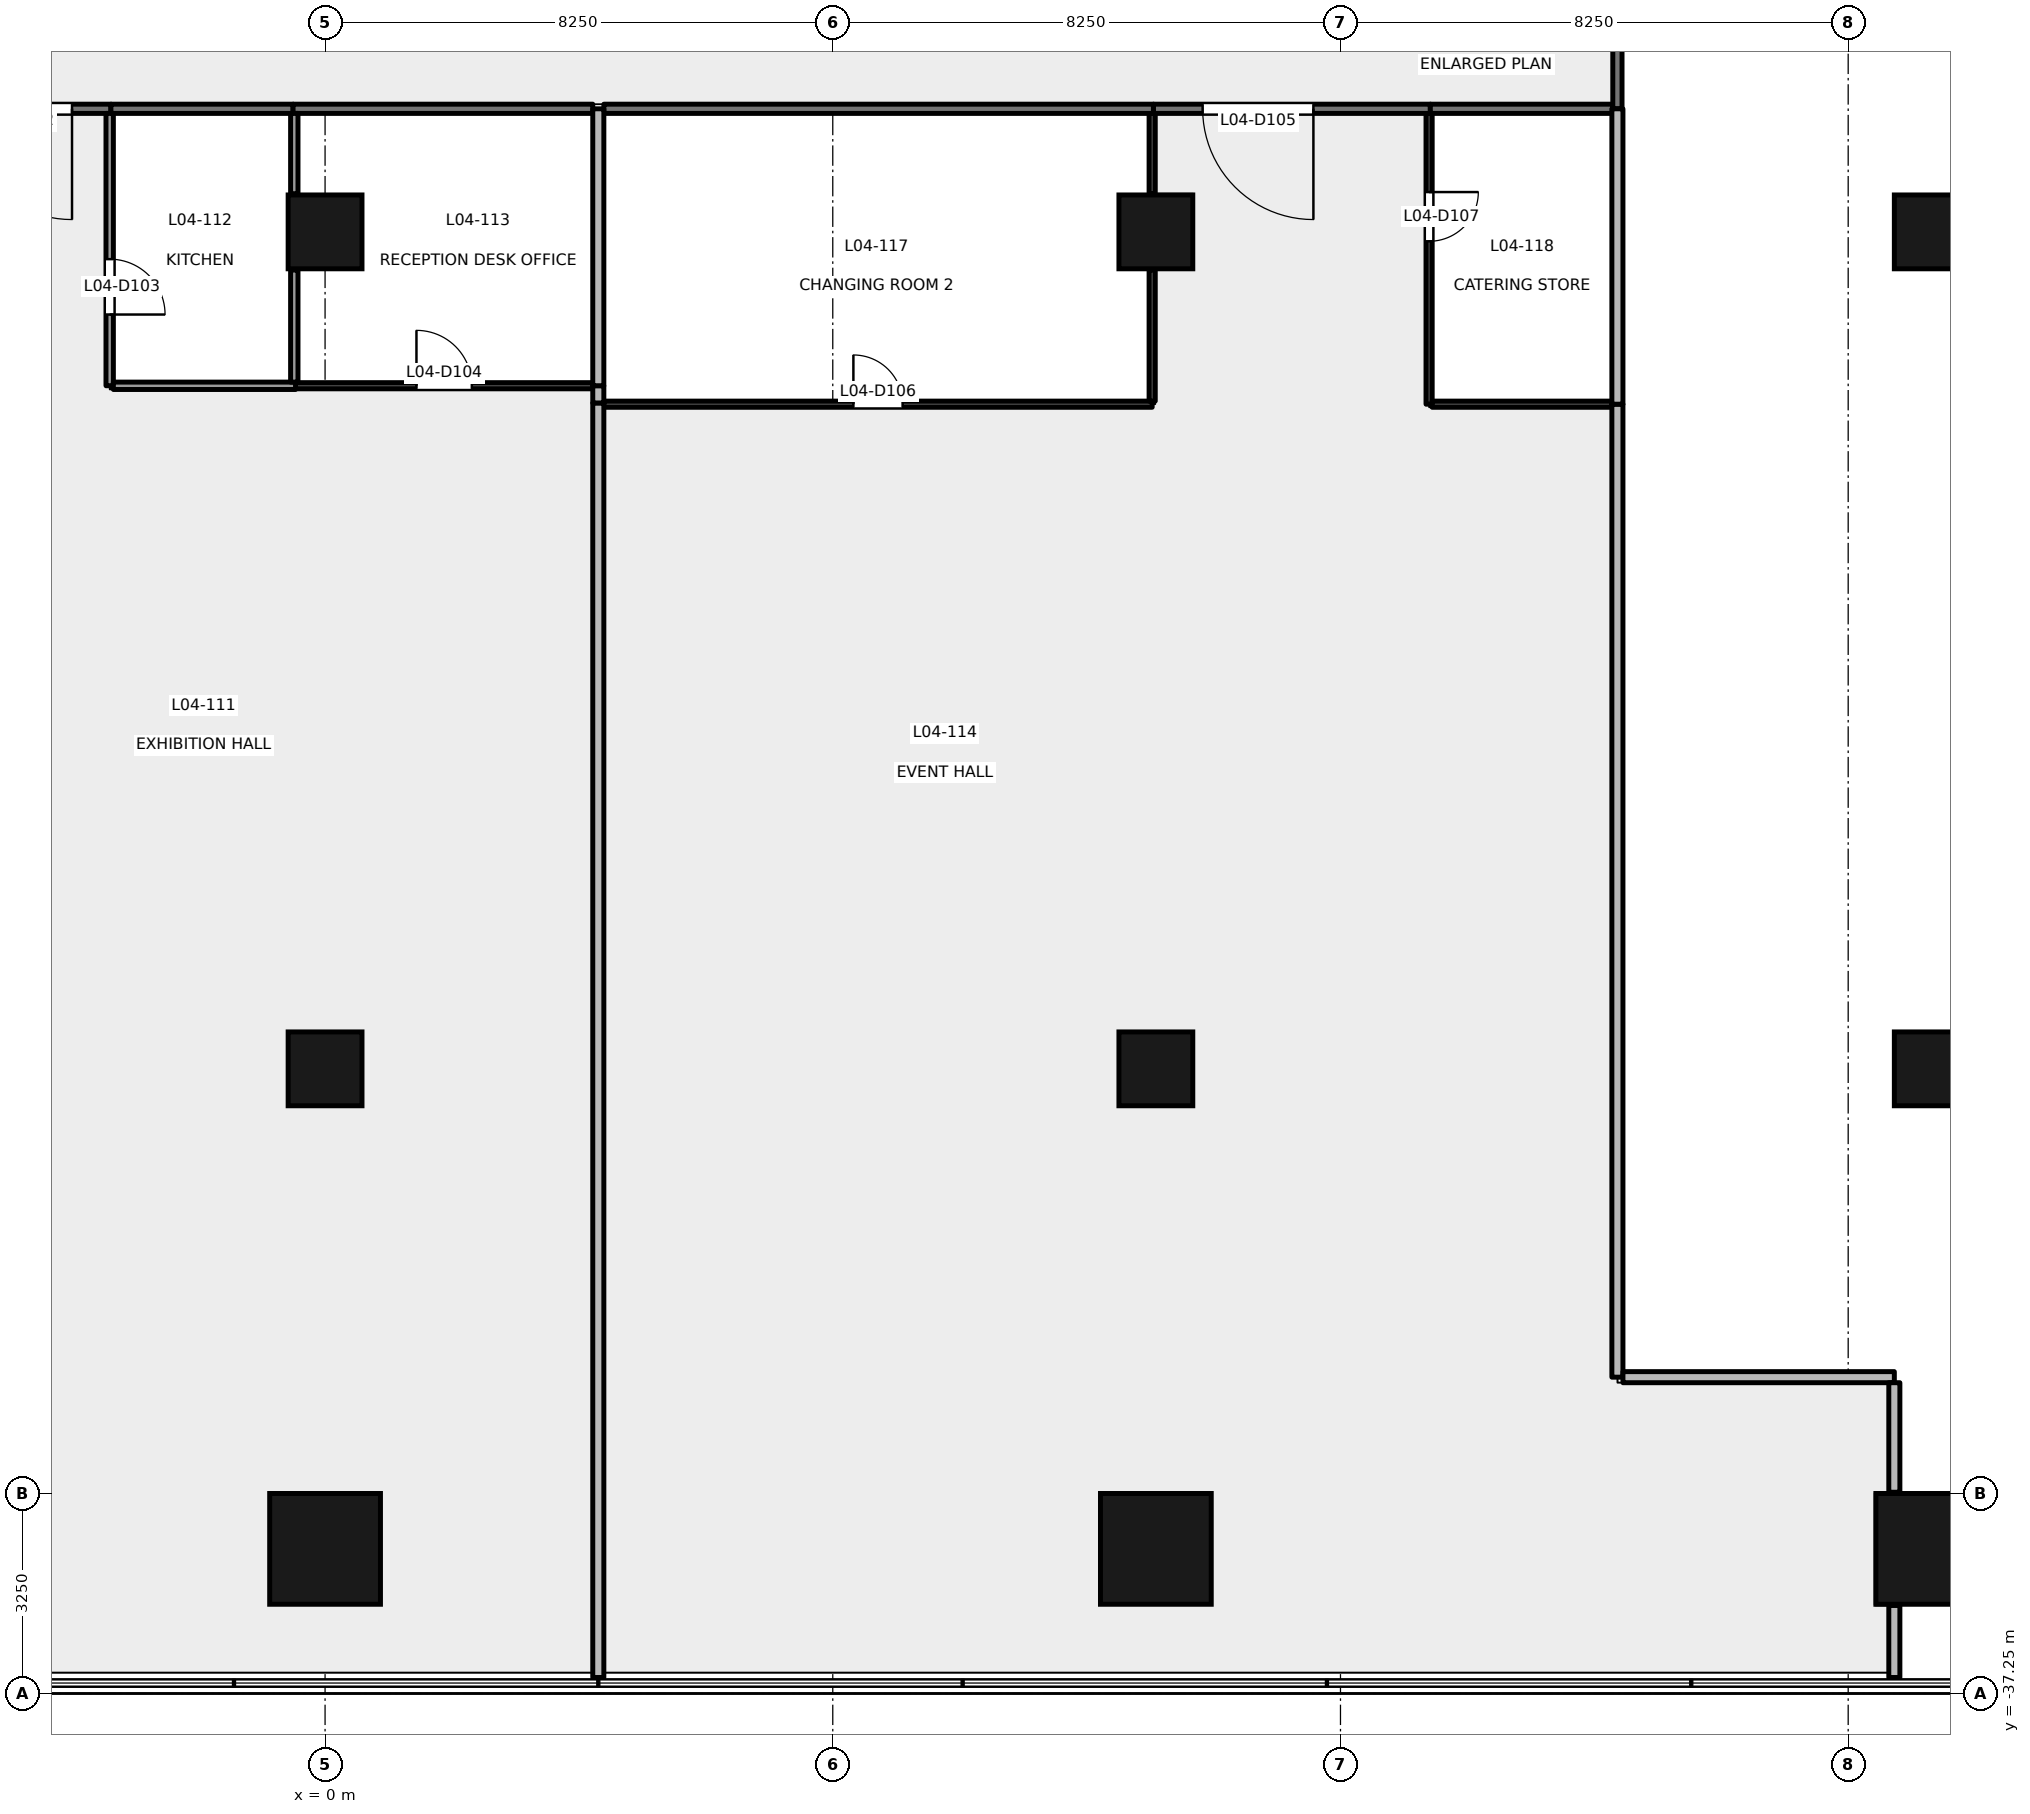
"""IFC4 building model, lengths in metres.
Left out: names, types, materials, properties, quantities, classifications, styles, units other than length and angle.
Written with IfcOpenShell. Run it as: python <this file> out.ifc"""

import sys

from ifc_helpers import new_model, si_unit, direction, frame, frame_2d, origin, origin_2d, place, context, subcontext, project, spatial, rectangle, extrude, element, fill, save


model = new_model("IFC4")
c1 = context("Model", 3, precision=1e-05, world=origin(), true_north=direction((0.0, 1.0)))
c2 = subcontext(c1, "Body", "Model", "MODEL_VIEW")
j1 = project(units=[si_unit("LENGTHUNIT", "METRE"), si_unit("PLANEANGLEUNIT", "RADIAN")], contexts=[c1])
p1 = place(None, origin())
s1 = spatial("IfcSite", under=j1, at=p1, CompositionType="ELEMENT")
p2 = place(p1, origin())
s2 = spatial("IfcBuilding", under=s1, at=p2, CompositionType="ELEMENT")
p3 = place(p2, frame((0.0, 0.0, 22.2)))
s3 = spatial("IfcBuildingStorey", under=s2, at=p3, CompositionType="ELEMENT", Elevation=22.2)
for number, where, z_axis, x_axis in (
    (1, (0.0, -34.9, -0.2), (0.0, 0.0, 1.0), (1.0, 0.0, 0.0)),
    (2, (13.5, -34.9, -0.2), (0.0, 0.0, 1.0), (1.0, 0.0, 0.0)),
    (3, (26.1, -34.9, -0.2), (0.0, 0.0, 1.0), (1.0, 0.0, 0.0)),
):
    element("IfcColumn", number, at=place(p3, frame(where, z_axis=z_axis, x_axis=x_axis)), inside=s3, PredefinedType="COLUMN", context=c2, shape_type="SweptSolid", body=[
        extrude(rectangle(XDim=1.8, YDim=1.8, at=origin_2d()), origin(), (0.0, 0.0, 1.0), 4.8),
    ])
for number, where, z_axis, x_axis in (
    (4, (0.0, -27.1, -0.2), (0.0, 0.0, 1.0), (1.0, 0.0, 0.0)),
    (5, (13.5, -27.1, -0.2), (0.0, 0.0, 1.0), (1.0, 0.0, 0.0)),
    (6, (26.1, -27.1, -0.2), (0.0, 0.0, 1.0), (1.0, 0.0, 0.0)),
    (7, (0.0, -13.5, -0.2), (0.0, 0.0, 1.0), (1.0, 0.0, 0.0)),
    (8, (13.5, -13.5, -0.2), (0.0, 0.0, 1.0), (1.0, 0.0, 0.0)),
    (9, (26.1, -13.5, -0.2), (0.0, 0.0, 1.0), (1.0, 0.0, 0.0)),
):
    element("IfcColumn", number, at=place(p3, frame(where, z_axis=z_axis, x_axis=x_axis)), inside=s3, PredefinedType="COLUMN", context=c2, shape_type="SweptSolid", body=[
        extrude(rectangle(XDim=1.2, YDim=1.2, at=origin_2d()), origin(), (0.0, 0.0, 1.0), 4.8),
    ])
p4 = place(p3, frame((-3.48, -11.5, 0.0), z_axis=(0.0, 0.0, 1.0), x_axis=(-1.0, 0.0, 0.0)))
e10 = element("IfcWall", 10, at=p4, inside=s3, PredefinedType="PARTITIONING", context=c2, shape_type="SweptSolid", body=[
    extrude(rectangle(XDim=3.83, YDim=0.15, at=frame_2d((1.915, 0.0))), origin(), (0.0, 0.0, 1.0), 3.6),
])
p5 = place(p4, frame((0.632, 0.0, 0.0)))
e11 = element("IfcOpeningElement", 11, at=p5, cuts=e10, PredefinedType="OPENING", context=c2, shape_type="SweptSolid", body=[
    extrude(rectangle(XDim=1.8, YDim=2.1, at=frame_2d((0.9, 1.05))), frame((0.0, 0.085, 0.0), z_axis=(0.0, -1.0, 0.0), x_axis=(1.0, 0.0, 0.0)), (0.0, 0.0, 1.0), 0.171),
])
p6 = place(p3, frame((-0.52, -11.5, 0.0), z_axis=(0.0, 0.0, 1.0), x_axis=(-1.0, 0.0, 0.0)))
e12 = element("IfcWall", 12, at=p6, inside=s3, PredefinedType="PARTITIONING", context=c2, shape_type="SweptSolid", body=[
    extrude(rectangle(XDim=2.96, YDim=0.15, at=frame_2d((1.48, 0.0))), origin(), (0.0, 0.0, 1.0), 4.6),
])
p7 = place(p3, frame((4.35, -11.5, 0.0), z_axis=(0.0, 0.0, 1.0), x_axis=(-1.0, 0.0, 0.0)))
e13 = element("IfcWall", 13, at=p7, inside=s3, PredefinedType="PARTITIONING", context=c2, shape_type="SweptSolid", body=[
    extrude(rectangle(XDim=4.87, YDim=0.15, at=frame_2d((2.435, 0.0))), origin(), (0.0, 0.0, 1.0), 3.6),
])
p8 = place(p3, frame((17.96, -11.5, 0.0), z_axis=(0.0, 0.0, 1.0), x_axis=(-1.0, 0.0, 0.0)))
e14 = element("IfcWall", 14, at=p8, inside=s3, PredefinedType="PARTITIONING", context=c2, shape_type="SweptSolid", body=[
    extrude(rectangle(XDim=4.5, YDim=0.15, at=frame_2d((2.25, 0.0))), origin(), (0.0, 0.0, 1.0), 3.2),
])
p9 = place(p8, frame((1.9, 0.0, 0.0)))
e15 = element("IfcOpeningElement", 15, at=p9, cuts=e14, PredefinedType="OPENING", context=c2, shape_type="SweptSolid", body=[
    extrude(rectangle(XDim=1.8, YDim=2.1, at=frame_2d((0.9, 1.05))), frame((0.0, 0.085, 0.0), z_axis=(0.0, -1.0, 0.0), x_axis=(1.0, 0.0, 0.0)), (0.0, 0.0, 1.0), 0.171),
])
p10 = place(p3, frame((13.46, -11.5, 0.0), z_axis=(0.0, 0.0, 1.0), x_axis=(-1.0, 0.0, 0.0)))
e16 = element("IfcWall", 16, at=p10, inside=s3, PredefinedType="PARTITIONING", context=c2, shape_type="SweptSolid", body=[
    extrude(rectangle(XDim=8.93, YDim=0.15, at=frame_2d((4.465, 0.0))), origin(), (0.0, 0.0, 1.0), 3.6),
])
p11 = place(p3, frame((20.925, -11.5, 0.0), z_axis=(0.0, 0.0, 1.0), x_axis=(-1.0, 0.0, 0.0)))
e17 = element("IfcWall", 17, at=p11, inside=s3, PredefinedType="PARTITIONING", context=c2, shape_type="SweptSolid", body=[
    extrude(rectangle(XDim=2.965, YDim=0.15, at=frame_2d((1.482, 0.0))), origin(), (0.0, 0.0, 1.0), 3.2),
])
p12 = place(p3, frame((21.0, -7.4, 0.0), z_axis=(0.0, 0.0, 1.0), x_axis=(0.0, -1.0, 0.0)))
e18 = element("IfcWall", 18, at=p12, inside=s3, PredefinedType="PARTITIONING", context=c2, shape_type="SweptSolid", body=[
    extrude(rectangle(XDim=4.1, YDim=0.15, at=frame_2d((2.05, 0.0))), origin(), (0.0, 0.0, 1.0), 4.0),
])
p13 = place(p12, frame((1.15, 0.0, 0.0)))
e19 = element("IfcOpeningElement", 19, at=p13, cuts=e18, PredefinedType="OPENING", context=c2, shape_type="SweptSolid", body=[
    extrude(rectangle(XDim=1.8, YDim=2.1, at=frame_2d((0.9, 1.05))), frame((0.0, 0.085, 0.0), z_axis=(0.0, -1.0, 0.0), x_axis=(1.0, 0.0, 0.0)), (0.0, 0.0, 1.0), 0.171),
])
p14 = place(p3, frame((-3.5, -11.575, 0.0), z_axis=(0.0, 0.0, 1.0), x_axis=(0.0, -1.0, 0.0)))
e20 = element("IfcWall", 20, at=p14, inside=s3, PredefinedType="PARTITIONING", context=c2, shape_type="SweptSolid", body=[
    extrude(rectangle(XDim=4.425, YDim=0.12, at=frame_2d((2.212, 0.0))), origin(), (0.0, 0.0, 1.0), 4.6),
])
p15 = place(p14, frame((2.368, 0.0, 0.0)))
e21 = element("IfcOpeningElement", 21, at=p15, cuts=e20, PredefinedType="OPENING", context=c2, shape_type="SweptSolid", body=[
    extrude(rectangle(XDim=0.9, YDim=2.1, at=frame_2d((0.45, 1.05))), frame((0.0, 0.071, 0.0), z_axis=(0.0, -1.0, 0.0), x_axis=(1.0, 0.0, 0.0)), (0.0, 0.0, 1.0), 0.141),
])
p16 = place(p3, frame((-3.44, -16.001, 0.0), z_axis=(0.0, 0.0, 1.0), x_axis=(1.0, 0.0, 0.0)))
e22 = element("IfcWall", 22, at=p16, inside=s3, PredefinedType="PARTITIONING", context=c2, shape_type="SweptSolid", body=[
    extrude(rectangle(XDim=2.96, YDim=0.12, at=frame_2d((1.48, 0.0))), origin(), (0.0, 0.0, 1.0), 4.6),
])
p17 = place(p3, frame((-0.48, -16.0, 0.0), z_axis=(0.0, 0.0, 1.0), x_axis=(1.0, 0.0, 0.0)))
e23 = element("IfcWall", 23, at=p17, inside=s3, PredefinedType="PARTITIONING", context=c2, shape_type="SweptSolid", body=[
    extrude(rectangle(XDim=4.83, YDim=0.1, at=frame_2d((2.415, 0.0))), origin(), (0.0, 0.0, 1.0), 3.6),
])
p18 = place(p17, frame((1.965, 0.0, 0.0)))
e24 = element("IfcOpeningElement", 24, at=p18, cuts=e23, PredefinedType="OPENING", context=c2, shape_type="SweptSolid", body=[
    extrude(rectangle(XDim=0.9, YDim=2.1, at=frame_2d((0.45, 1.05))), frame((0.0, 0.061, 0.0), z_axis=(0.0, -1.0, 0.0), x_axis=(1.0, 0.0, 0.0)), (0.0, 0.0, 1.0), 0.121),
])
p19 = place(p3, frame((4.44, -16.28, 0.0), z_axis=(0.0, 0.0, 1.0), x_axis=(0.0, -1.0, 0.0)))
e25 = element("IfcWall", 25, at=p19, inside=s3, PredefinedType="PARTITIONING", context=c2, shape_type="SweptSolid", body=[
    extrude(rectangle(XDim=20.71, YDim=0.18, at=frame_2d((10.355, 0.0))), origin(), (0.0, 0.0, 1.0), 3.5),
])
p20 = place(p3, frame((4.44, -16.0, 0.0), z_axis=(0.0, 0.0, 1.0), x_axis=(0.0, -1.0, 0.0)))
e26 = element("IfcWall", 26, at=p20, inside=s3, PredefinedType="PARTITIONING", context=c2, shape_type="SweptSolid", body=[
    extrude(rectangle(XDim=0.28, YDim=0.18, at=frame_2d((0.14, 0.0))), origin(), (0.0, 0.0, 1.0), 3.6),
])
p21 = place(p3, frame((-0.5, -11.575, 0.0), z_axis=(0.0, 0.0, 1.0), x_axis=(0.0, -1.0, 0.0)))
e27 = element("IfcWall", 27, at=p21, inside=s3, PredefinedType="PARTITIONING", context=c2, shape_type="SweptSolid", body=[
    extrude(rectangle(XDim=1.305, YDim=0.12, at=frame_2d((0.652, 0.0))), origin(), (0.0, 0.0, 1.0), 4.6),
])
p22 = place(p3, frame((-0.5, -14.12, 0.0), z_axis=(0.0, 0.0, 1.0), x_axis=(0.0, -1.0, 0.0)))
e28 = element("IfcWall", 28, at=p22, inside=s3, PredefinedType="PARTITIONING", context=c2, shape_type="SweptSolid", body=[
    extrude(rectangle(XDim=1.821, YDim=0.12, at=frame_2d((0.91, 0.0))), origin(), (0.0, 0.0, 1.0), 4.6),
])
p23 = place(p3, frame((4.44, -11.5, 0.0), z_axis=(0.0, 0.0, 1.0), x_axis=(0.0, -1.0, 0.0)))
e29 = element("IfcWall", 29, at=p23, inside=s3, PredefinedType="PARTITIONING", context=c2, shape_type="SweptSolid", body=[
    extrude(rectangle(XDim=4.5, YDim=0.18, at=frame_2d((2.25, 0.0))), origin(), (0.0, 0.0, 1.0), 3.6),
])
p24 = place(p3, frame((4.53, -16.3, 0.0), z_axis=(0.0, 0.0, 1.0), x_axis=(1.0, 0.0, 0.0)))
e30 = element("IfcWall", 30, at=p24, inside=s3, PredefinedType="PARTITIONING", context=c2, shape_type="SweptSolid", body=[
    extrude(rectangle(XDim=8.91, YDim=0.1, at=frame_2d((4.455, 0.0))), origin(), (0.0, 0.0, 1.0), 3.6),
])
p25 = place(p24, frame((4.055, 0.0, 0.0)))
e31 = element("IfcOpeningElement", 31, at=p25, cuts=e30, PredefinedType="OPENING", context=c2, shape_type="SweptSolid", body=[
    extrude(rectangle(XDim=0.8, YDim=2.1, at=frame_2d((0.4, 1.05))), frame((0.0, 0.061, 0.0), z_axis=(0.0, -1.0, 0.0), x_axis=(1.0, 0.0, 0.0)), (0.0, 0.0, 1.0), 0.121),
])
p26 = place(p3, frame((13.44, -12.88, 0.0), z_axis=(0.0, 0.0, 1.0), x_axis=(0.0, 1.0, 0.0)))
e32 = element("IfcWall", 32, at=p26, inside=s3, PredefinedType="PARTITIONING", context=c2, shape_type="SweptSolid", body=[
    extrude(rectangle(XDim=1.305, YDim=0.1, at=frame_2d((0.652, 0.0))), origin(), (0.0, 0.0, 1.0), 3.6),
])
p27 = place(p3, frame((13.44, -16.25, 0.0), z_axis=(0.0, 0.0, 1.0), x_axis=(0.0, 1.0, 0.0)))
e33 = element("IfcWall", 33, at=p27, inside=s3, PredefinedType="PARTITIONING", context=c2, shape_type="SweptSolid", body=[
    extrude(rectangle(XDim=2.13, YDim=0.1, at=frame_2d((1.065, 0.0))), origin(), (0.0, 0.0, 1.0), 3.6),
])
p28 = place(p3, frame((17.94, -11.575, 0.0), z_axis=(0.0, 0.0, 1.0), x_axis=(0.0, -1.0, 0.0)))
e34 = element("IfcWall", 34, at=p28, inside=s3, PredefinedType="PARTITIONING", context=c2, shape_type="SweptSolid", body=[
    extrude(rectangle(XDim=4.725, YDim=0.1, at=frame_2d((2.363, 0.0))), origin(), (0.0, 0.0, 1.0), 3.2),
])
p29 = place(p28, frame((1.278, 0.0, 0.0)))
e35 = element("IfcOpeningElement", 35, at=p29, cuts=e34, PredefinedType="OPENING", context=c2, shape_type="SweptSolid", body=[
    extrude(rectangle(XDim=0.8, YDim=2.1, at=frame_2d((0.4, 1.05))), frame((0.0, 0.061, 0.0), z_axis=(0.0, -1.0, 0.0), x_axis=(1.0, 0.0, 0.0)), (0.0, 0.0, 1.0), 0.121),
])
p30 = place(p3, frame((17.99, -16.3, 0.0), z_axis=(0.0, 0.0, 1.0), x_axis=(1.0, 0.0, 0.0)))
e36 = element("IfcWall", 36, at=p30, inside=s3, PredefinedType="PARTITIONING", context=c2, shape_type="SweptSolid", body=[
    extrude(rectangle(XDim=2.92, YDim=0.1, at=frame_2d((1.46, 0.0))), origin(), (0.0, 0.0, 1.0), 3.2),
])
p31 = place(p3, frame((21.0, -16.3, 0.0), z_axis=(0.0, 0.0, 1.0), x_axis=(0.0, -1.0, 0.0)))
e37 = element("IfcWall", 37, at=p31, inside=s3, PredefinedType="PARTITIONING", context=c2, shape_type="SweptSolid", body=[
    extrude(rectangle(XDim=15.81, YDim=0.18, at=frame_2d((7.905, 0.0))), origin(), (0.0, 0.0, 1.0), 4.0),
])
p32 = place(p3, frame((21.09, -32.11, 0.0), z_axis=(0.0, 0.0, 1.0), x_axis=(1.0, 0.0, 0.0)))
e38 = element("IfcWall", 38, at=p32, inside=s3, PredefinedType="PARTITIONING", context=c2, shape_type="SweptSolid", body=[
    extrude(rectangle(XDim=4.41, YDim=0.18, at=frame_2d((2.205, 0.0))), origin(), (0.0, 0.0, 1.0), 4.6),
])
p33 = place(p3, frame((25.5, -35.82, 0.0), z_axis=(0.0, 0.0, 1.0), x_axis=(0.0, -1.0, 0.0)))
e39 = element("IfcWall", 39, at=p33, inside=s3, PredefinedType="PARTITIONING", context=c2, shape_type="SweptSolid", body=[
    extrude(rectangle(XDim=1.17, YDim=0.18, at=frame_2d((0.585, 0.0))), origin(), (0.0, 0.0, 1.0), 4.6),
])
p34 = place(p3, frame((25.5, -32.2, 0.0), z_axis=(0.0, 0.0, 1.0), x_axis=(0.0, -1.0, 0.0)))
e40 = element("IfcWall", 40, at=p34, inside=s3, PredefinedType="PARTITIONING", context=c2, shape_type="SweptSolid", body=[
    extrude(rectangle(XDim=1.78, YDim=0.18, at=frame_2d((0.89, 0.0))), origin(), (0.0, 0.0, 1.0), 3.5),
])
p35 = place(p3, frame((21.0, -11.5, 0.0), z_axis=(0.0, 0.0, 1.0), x_axis=(0.0, -1.0, 0.0)))
e41 = element("IfcWall", 41, at=p35, inside=s3, PredefinedType="PARTITIONING", context=c2, shape_type="SweptSolid", body=[
    extrude(rectangle(XDim=4.8, YDim=0.18, at=frame_2d((2.4, 0.0))), origin(), (0.0, 0.0, 1.0), 4.0),
])
p36 = place(p5, origin())
e42 = element("IfcDoor", 42, at=p36, inside=s3, OperationType="DOUBLE_DOOR_SINGLE_SWING", PredefinedType="DOOR", context=c2, shape_type="SweptSolid", body=[
    extrude(rectangle(XDim=1.8, YDim=2.1, at=frame_2d((0.9, 1.05))), frame((0.0, 0.025, 0.0), z_axis=(0.0, -1.0, 0.0), x_axis=(1.0, 0.0, 0.0)), (0.0, 0.0, 1.0), 0.05),
])
fill(e11, e42)
p37 = place(p15, origin())
e43 = element("IfcDoor", 43, at=p37, inside=s3, OperationType="SINGLE_SWING_RIGHT", PredefinedType="DOOR", context=c2, shape_type="SweptSolid", body=[
    extrude(rectangle(XDim=0.9, YDim=2.1, at=frame_2d((0.45, 1.05))), frame((0.0, 0.025, 0.0), z_axis=(0.0, -1.0, 0.0), x_axis=(1.0, 0.0, 0.0)), (0.0, 0.0, 1.0), 0.05),
])
fill(e21, e43)
p38 = place(p18, origin())
e44 = element("IfcDoor", 44, at=p38, inside=s3, OperationType="SINGLE_SWING_LEFT", PredefinedType="DOOR", context=c2, shape_type="SweptSolid", body=[
    extrude(rectangle(XDim=0.9, YDim=2.1, at=frame_2d((0.45, 1.05))), frame((0.0, 0.025, 0.0), z_axis=(0.0, -1.0, 0.0), x_axis=(1.0, 0.0, 0.0)), (0.0, 0.0, 1.0), 0.05),
])
fill(e24, e44)
p39 = place(p9, origin())
e45 = element("IfcDoor", 45, at=p39, inside=s3, OperationType="DOUBLE_DOOR_SINGLE_SWING", PredefinedType="DOOR", context=c2, shape_type="SweptSolid", body=[
    extrude(rectangle(XDim=1.8, YDim=2.1, at=frame_2d((0.9, 1.05))), frame((0.0, 0.025, 0.0), z_axis=(0.0, -1.0, 0.0), x_axis=(1.0, 0.0, 0.0)), (0.0, 0.0, 1.0), 0.05),
])
fill(e15, e45)
p40 = place(p25, origin())
e46 = element("IfcDoor", 46, at=p40, inside=s3, OperationType="SINGLE_SWING_LEFT", PredefinedType="DOOR", context=c2, shape_type="SweptSolid", body=[
    extrude(rectangle(XDim=0.8, YDim=2.1, at=frame_2d((0.4, 1.05))), frame((0.0, 0.025, 0.0), z_axis=(0.0, -1.0, 0.0), x_axis=(1.0, 0.0, 0.0)), (0.0, 0.0, 1.0), 0.05),
])
fill(e31, e46)
p41 = place(p29, origin())
e47 = element("IfcDoor", 47, at=p41, inside=s3, OperationType="SINGLE_SWING_LEFT", PredefinedType="DOOR", context=c2, shape_type="SweptSolid", body=[
    extrude(rectangle(XDim=0.8, YDim=2.1, at=frame_2d((0.4, 1.05))), frame((0.0, 0.025, 0.0), z_axis=(0.0, -1.0, 0.0), x_axis=(1.0, 0.0, 0.0)), (0.0, 0.0, 1.0), 0.05),
])
fill(e35, e47)
save(model, sys.argv[1])
